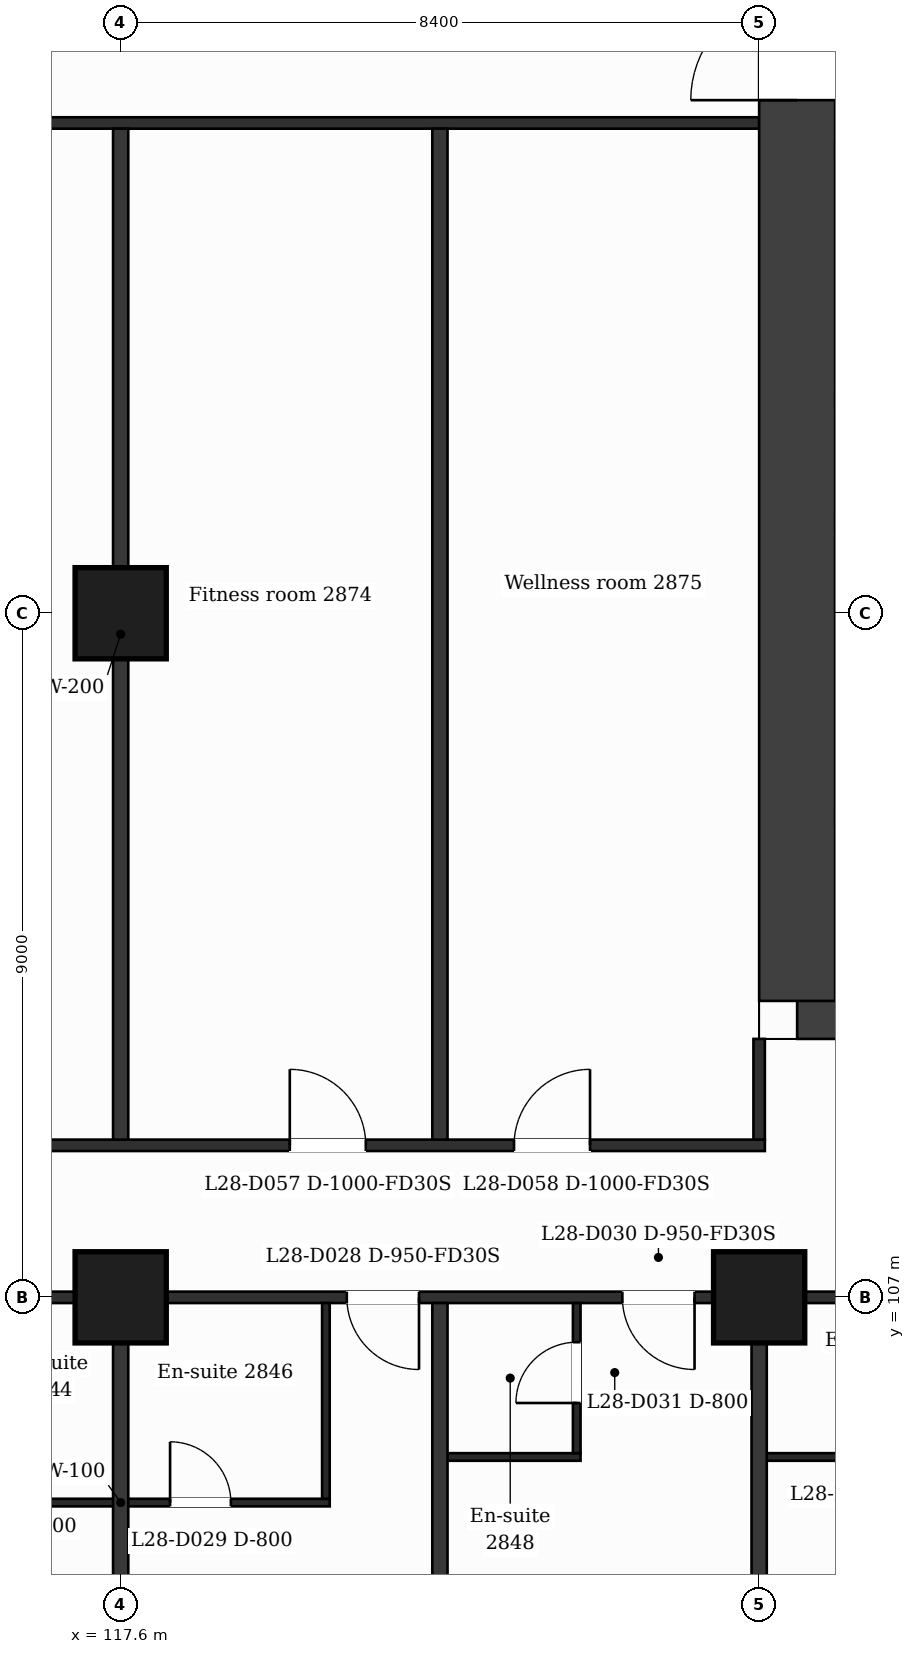
"""IFC4 building model, lengths in metres.
Left out: names, types, materials, properties, quantities, classifications, styles, units other than length and angle.
Written with IfcOpenShell. Run it as: python <this file> out.ifc"""

import sys

from ifc_helpers import new_model, si_unit, direction, frame, frame_2d, origin, origin_2d, place, context, subcontext, project, spatial, rectangle, extrude, element, fill, save


model = new_model("IFC4")
c1 = context("Model", 3, precision=1e-05, world=origin(), true_north=direction((0.0, 1.0)))
c2 = subcontext(c1, "Body", "Model", "MODEL_VIEW")
j1 = project(units=[si_unit("LENGTHUNIT", "METRE"), si_unit("PLANEANGLEUNIT", "RADIAN")], contexts=[c1])
p1 = place(None, origin())
s1 = spatial("IfcSite", under=j1, at=p1, CompositionType="ELEMENT")
p2 = place(p1, origin())
s2 = spatial("IfcBuilding", under=s1, at=p2, CompositionType="ELEMENT")
p3 = place(p2, frame((0.0, 0.0, 120.6)))
s3 = spatial("IfcBuildingStorey", under=s2, at=p3, CompositionType="ELEMENT", Elevation=120.6)
p4 = place(p3, frame((140.559, 110.9, 0.0), z_axis=(0.0, 0.0, 1.0), x_axis=(-1.0, 0.0, 0.0)))
e1 = element("IfcWall", 1, at=p4, inside=s3, PredefinedType="SHEAR", context=c2, shape_type="SweptSolid", body=[
    extrude(rectangle(XDim=14.059, YDim=1.0, at=frame_2d((7.029, 0.0))), origin(), (0.0, 0.0, 1.0), 3.7),
])
p5 = place(p4, frame((6.858, 0.0, 0.0)))
e2 = element("IfcOpeningElement", 2, at=p5, cuts=e1, PredefinedType="OPENING", context=c2, shape_type="SweptSolid", body=[
    extrude(rectangle(XDim=1.4, YDim=2.1, at=frame_2d((0.7, 1.05))), frame((0.0, 0.51, 0.0), z_axis=(0.0, -1.0, 0.0), x_axis=(1.0, 0.0, 0.0)), (0.0, 0.0, 1.0), 1.02),
])
p6 = place(p3, frame((126.5, 110.9, 0.0), z_axis=(0.0, 0.0, 1.0), x_axis=(0.0, 1.0, 0.0)))
e3 = element("IfcWall", 3, at=p6, inside=s3, PredefinedType="SHEAR", context=c2, shape_type="SweptSolid", body=[
    extrude(rectangle(XDim=21.0, YDim=1.0, at=frame_2d((10.5, 0.0))), origin(), (0.0, 0.0, 1.0), 3.7),
])
p7 = place(p6, frame((11.85, 0.0, 0.0)))
e4 = element("IfcOpeningElement", 4, at=p7, cuts=e3, PredefinedType="OPENING", context=c2, shape_type="SweptSolid", body=[
    extrude(rectangle(XDim=1.4, YDim=2.1, at=frame_2d((0.7, 1.05))), frame((0.0, 0.51, 0.0), z_axis=(0.0, -1.0, 0.0), x_axis=(1.0, 0.0, 0.0)), (0.0, 0.0, 1.0), 1.02),
])
for number, where, z_axis, x_axis in (
    (5, (117.6, 107.0, 0.0), (0.0, 0.0, 1.0), (1.0, 0.0, 0.0)),
    (6, (126.0, 107.0, 0.0), (0.0, 0.0, 1.0), (1.0, 0.0, 0.0)),
    (7, (117.6, 116.0, 0.0), (0.0, 0.0, 1.0), (1.0, 0.0, 0.0)),
):
    element("IfcColumn", number, at=place(p3, frame(where, z_axis=z_axis, x_axis=x_axis)), inside=s3, PredefinedType="COLUMN", context=c2, shape_type="SweptSolid", body=[
        extrude(rectangle(XDim=1.2, YDim=1.2, at=origin_2d()), origin(), (0.0, 0.0, 1.0), 3.7),
    ])
p8 = place(p3, frame((114.85, 104.3, 0.0), z_axis=(0.0, 0.0, 1.0), x_axis=(1.0, 0.0, 0.0)))
e8 = element("IfcWall", 8, at=p8, inside=s3, PredefinedType="PARTITIONING", context=c2, shape_type="SweptSolid", body=[
    extrude(rectangle(XDim=5.5, YDim=0.1, at=frame_2d((2.75, 0.0))), origin(), (0.0, 0.0, 1.0), 3.38),
])
p9 = place(p8, frame((3.4, 0.0, 0.0)))
e9 = element("IfcOpeningElement", 9, at=p9, cuts=e8, PredefinedType="OPENING", context=c2, shape_type="SweptSolid", body=[
    extrude(rectangle(XDim=0.8, YDim=2.1, at=frame_2d((0.4, 1.05))), frame((0.0, 0.06, 0.0), z_axis=(0.0, -1.0, 0.0), x_axis=(1.0, 0.0, 0.0)), (0.0, 0.0, 1.0), 0.12),
])
p10 = place(p3, frame((121.8, 104.9, 0.0), z_axis=(0.0, 0.0, 1.0), x_axis=(1.0, 0.0, 0.0)))
e10 = element("IfcWall", 10, at=p10, inside=s3, PredefinedType="PARTITIONING", context=c2, shape_type="SweptSolid", body=[
    extrude(rectangle(XDim=1.85, YDim=0.1, at=frame_2d((0.925, 0.0))), origin(), (0.0, 0.0, 1.0), 3.38),
])
p11 = place(p3, frame((126.0, 104.9, 0.0), z_axis=(0.0, 0.0, 1.0), x_axis=(1.0, 0.0, 0.0)))
e11 = element("IfcWall", 11, at=p11, inside=s3, PredefinedType="PARTITIONING", context=c2, shape_type="SweptSolid", body=[
    extrude(rectangle(XDim=2.75, YDim=0.1, at=frame_2d((1.375, 0.0))), origin(), (0.0, 0.0, 1.0), 3.38),
])
p12 = place(p11, frame((1.07, 0.0, 0.0)))
e12 = element("IfcOpeningElement", 12, at=p12, cuts=e11, PredefinedType="OPENING", context=c2, shape_type="SweptSolid", body=[
    extrude(rectangle(XDim=0.8, YDim=2.1, at=frame_2d((0.4, 1.05))), frame((0.0, 0.06, 0.0), z_axis=(0.0, -1.0, 0.0), x_axis=(1.0, 0.0, 0.0)), (0.0, 0.0, 1.0), 0.12),
])
p13 = place(p3, frame((87.018, 107.0, 0.0), z_axis=(0.0, 0.0, 1.0), x_axis=(1.0, 0.0, 0.0)))
e13 = element("IfcWall", 13, at=p13, inside=s3, PredefinedType="PARTITIONING", context=c2, shape_type="SweptSolid", body=[
    extrude(rectangle(XDim=52.765, YDim=0.15, at=frame_2d((26.382, 0.0))), origin(), (0.0, 0.0, 1.0), 3.38),
])
p14 = place(p13, frame((1.276, 0.0, 0.0)))
e14 = element("IfcOpeningElement", 14, at=p14, cuts=e13, PredefinedType="OPENING", context=c2, shape_type="SweptSolid", body=[
    extrude(rectangle(XDim=0.95, YDim=2.1, at=frame_2d((0.475, 1.05))), frame((0.0, 0.085, 0.0), z_axis=(0.0, -1.0, 0.0), x_axis=(1.0, 0.0, 0.0)), (0.0, 0.0, 1.0), 0.17),
])
p15 = place(p13, frame((6.192, 0.0, 0.0)))
e15 = element("IfcOpeningElement", 15, at=p15, cuts=e13, PredefinedType="OPENING", context=c2, shape_type="SweptSolid", body=[
    extrude(rectangle(XDim=0.95, YDim=2.1, at=frame_2d((0.475, 1.05))), frame((0.0, 0.085, 0.0), z_axis=(0.0, -1.0, 0.0), x_axis=(1.0, 0.0, 0.0)), (0.0, 0.0, 1.0), 0.17),
])
p16 = place(p13, frame((11.982, 0.0, 0.0)))
e16 = element("IfcOpeningElement", 16, at=p16, cuts=e13, PredefinedType="OPENING", context=c2, shape_type="SweptSolid", body=[
    extrude(rectangle(XDim=1.0, YDim=2.1, at=frame_2d((0.5, 1.05))), frame((0.0, 0.085, 0.0), z_axis=(0.0, -1.0, 0.0), x_axis=(1.0, 0.0, 0.0)), (0.0, 0.0, 1.0), 0.17),
])
p17 = place(p13, frame((14.582, 0.0, 0.0)))
e17 = element("IfcOpeningElement", 17, at=p17, cuts=e13, PredefinedType="OPENING", context=c2, shape_type="SweptSolid", body=[
    extrude(rectangle(XDim=0.95, YDim=2.1, at=frame_2d((0.475, 1.05))), frame((0.0, 0.085, 0.0), z_axis=(0.0, -1.0, 0.0), x_axis=(1.0, 0.0, 0.0)), (0.0, 0.0, 1.0), 0.17),
])
p18 = place(p13, frame((18.257, 0.0, 0.0)))
e18 = element("IfcOpeningElement", 18, at=p18, cuts=e13, PredefinedType="OPENING", context=c2, shape_type="SweptSolid", body=[
    extrude(rectangle(XDim=0.95, YDim=2.1, at=frame_2d((0.475, 1.05))), frame((0.0, 0.085, 0.0), z_axis=(0.0, -1.0, 0.0), x_axis=(1.0, 0.0, 0.0)), (0.0, 0.0, 1.0), 0.17),
])
p19 = place(p13, frame((22.992, 0.0, 0.0)))
e19 = element("IfcOpeningElement", 19, at=p19, cuts=e13, PredefinedType="OPENING", context=c2, shape_type="SweptSolid", body=[
    extrude(rectangle(XDim=0.95, YDim=2.1, at=frame_2d((0.475, 1.05))), frame((0.0, 0.085, 0.0), z_axis=(0.0, -1.0, 0.0), x_axis=(1.0, 0.0, 0.0)), (0.0, 0.0, 1.0), 0.17),
])
p20 = place(p13, frame((26.632, 0.0, 0.0)))
e20 = element("IfcOpeningElement", 20, at=p20, cuts=e13, PredefinedType="OPENING", context=c2, shape_type="SweptSolid", body=[
    extrude(rectangle(XDim=1.0, YDim=2.1, at=frame_2d((0.5, 1.05))), frame((0.0, 0.085, 0.0), z_axis=(0.0, -1.0, 0.0), x_axis=(1.0, 0.0, 0.0)), (0.0, 0.0, 1.0), 0.17),
])
p21 = place(p13, frame((33.557, 0.0, 0.0)))
e21 = element("IfcOpeningElement", 21, at=p21, cuts=e13, PredefinedType="OPENING", context=c2, shape_type="SweptSolid", body=[
    extrude(rectangle(XDim=0.95, YDim=2.1, at=frame_2d((0.475, 1.05))), frame((0.0, 0.085, 0.0), z_axis=(0.0, -1.0, 0.0), x_axis=(1.0, 0.0, 0.0)), (0.0, 0.0, 1.0), 0.17),
])
p22 = place(p13, frame((37.182, 0.0, 0.0)))
e22 = element("IfcOpeningElement", 22, at=p22, cuts=e13, PredefinedType="OPENING", context=c2, shape_type="SweptSolid", body=[
    extrude(rectangle(XDim=0.95, YDim=2.1, at=frame_2d((0.475, 1.05))), frame((0.0, 0.085, 0.0), z_axis=(0.0, -1.0, 0.0), x_axis=(1.0, 0.0, 0.0)), (0.0, 0.0, 1.0), 0.17),
])
p23 = place(p13, frame((41.957, 0.0, 0.0)))
e23 = element("IfcOpeningElement", 23, at=p23, cuts=e13, PredefinedType="OPENING", context=c2, shape_type="SweptSolid", body=[
    extrude(rectangle(XDim=0.95, YDim=2.1, at=frame_2d((0.475, 1.05))), frame((0.0, 0.085, 0.0), z_axis=(0.0, -1.0, 0.0), x_axis=(1.0, 0.0, 0.0)), (0.0, 0.0, 1.0), 0.17),
])
p24 = place(p13, frame((45.622, 0.0, 0.0)))
e24 = element("IfcOpeningElement", 24, at=p24, cuts=e13, PredefinedType="OPENING", context=c2, shape_type="SweptSolid", body=[
    extrude(rectangle(XDim=0.95, YDim=2.1, at=frame_2d((0.475, 1.05))), frame((0.0, 0.085, 0.0), z_axis=(0.0, -1.0, 0.0), x_axis=(1.0, 0.0, 0.0)), (0.0, 0.0, 1.0), 0.17),
])
p25 = place(p13, frame((48.56, 0.0, 0.0)))
e25 = element("IfcOpeningElement", 25, at=p25, cuts=e13, PredefinedType="OPENING", context=c2, shape_type="SweptSolid", body=[
    extrude(rectangle(XDim=0.95, YDim=2.1, at=frame_2d((0.475, 1.05))), frame((0.0, 0.085, 0.0), z_axis=(0.0, -1.0, 0.0), x_axis=(1.0, 0.0, 0.0)), (0.0, 0.0, 1.0), 0.17),
])
p26 = place(p3, frame((100.725, 109.0, 0.0), z_axis=(0.0, 0.0, 1.0), x_axis=(1.0, 0.0, 0.0)))
e26 = element("IfcWall", 26, at=p26, inside=s3, PredefinedType="PARTITIONING", context=c2, shape_type="SweptSolid", body=[
    extrude(rectangle(XDim=25.35, YDim=0.15, at=frame_2d((12.675, 0.0))), origin(), (0.0, 0.0, 1.0), 3.38),
])
p27 = place(p26, frame((1.925, 0.0, 0.0)))
e27 = element("IfcOpeningElement", 27, at=p27, cuts=e26, PredefinedType="OPENING", context=c2, shape_type="SweptSolid", body=[
    extrude(rectangle(XDim=1.0, YDim=2.1, at=frame_2d((0.5, 1.05))), frame((0.0, 0.085, 0.0), z_axis=(0.0, -1.0, 0.0), x_axis=(1.0, 0.0, 0.0)), (0.0, 0.0, 1.0), 0.17),
])
p28 = place(p26, frame((6.125, 0.0, 0.0)))
e28 = element("IfcOpeningElement", 28, at=p28, cuts=e26, PredefinedType="OPENING", context=c2, shape_type="SweptSolid", body=[
    extrude(rectangle(XDim=1.0, YDim=2.1, at=frame_2d((0.5, 1.05))), frame((0.0, 0.085, 0.0), z_axis=(0.0, -1.0, 0.0), x_axis=(1.0, 0.0, 0.0)), (0.0, 0.0, 1.0), 0.17),
])
p29 = place(p26, frame((12.175, 0.0, 0.0)))
e29 = element("IfcOpeningElement", 29, at=p29, cuts=e26, PredefinedType="OPENING", context=c2, shape_type="SweptSolid", body=[
    extrude(rectangle(XDim=1.0, YDim=2.1, at=frame_2d((0.5, 1.05))), frame((0.0, 0.085, 0.0), z_axis=(0.0, -1.0, 0.0), x_axis=(1.0, 0.0, 0.0)), (0.0, 0.0, 1.0), 0.17),
])
p30 = place(p26, frame((19.1, 0.0, 0.0)))
e30 = element("IfcOpeningElement", 30, at=p30, cuts=e26, PredefinedType="OPENING", context=c2, shape_type="SweptSolid", body=[
    extrude(rectangle(XDim=1.0, YDim=2.1, at=frame_2d((0.5, 1.05))), frame((0.0, 0.085, 0.0), z_axis=(0.0, -1.0, 0.0), x_axis=(1.0, 0.0, 0.0)), (0.0, 0.0, 1.0), 0.17),
])
p31 = place(p26, frame((22.05, 0.0, 0.0)))
e31 = element("IfcOpeningElement", 31, at=p31, cuts=e26, PredefinedType="OPENING", context=c2, shape_type="SweptSolid", body=[
    extrude(rectangle(XDim=1.0, YDim=2.1, at=frame_2d((0.5, 1.05))), frame((0.0, 0.085, 0.0), z_axis=(0.0, -1.0, 0.0), x_axis=(1.0, 0.0, 0.0)), (0.0, 0.0, 1.0), 0.17),
])
p32 = place(p3, frame((127.0, 113.3, 0.0), z_axis=(0.0, 0.0, 1.0), x_axis=(1.0, 0.0, 0.0)))
e32 = element("IfcWall", 32, at=p32, inside=s3, PredefinedType="PARTITIONING", context=c2, shape_type="SweptSolid", body=[
    extrude(rectangle(XDim=4.673, YDim=0.2, at=frame_2d((2.336, 0.0))), origin(), (0.0, 0.0, 1.0), 3.38),
])
p33 = place(p32, frame((0.715, 0.0, 0.0)))
e33 = element("IfcOpeningElement", 33, at=p33, cuts=e32, PredefinedType="OPENING", context=c2, shape_type="SweptSolid", body=[
    extrude(rectangle(XDim=1.1, YDim=2.1, at=frame_2d((0.55, 1.05))), frame((0.0, 0.11, 0.0), z_axis=(0.0, -1.0, 0.0), x_axis=(1.0, 0.0, 0.0)), (0.0, 0.0, 1.0), 0.22),
])
p34 = place(p3, frame((100.8, 122.45, 0.0), z_axis=(0.0, 0.0, 1.0), x_axis=(1.0, 0.0, 0.0)))
e34 = element("IfcWall", 34, at=p34, inside=s3, PredefinedType="PARTITIONING", context=c2, shape_type="SweptSolid", body=[
    extrude(rectangle(XDim=25.2, YDim=0.15, at=frame_2d((12.6, 0.0))), origin(), (0.0, 0.0, 1.0), 3.38),
])
p35 = place(p3, frame((117.6, 99.79, 0.0), z_axis=(0.0, 0.0, 1.0), x_axis=(0.0, 1.0, 0.0)))
e35 = element("IfcWall", 35, at=p35, inside=s3, PredefinedType="PARTITIONING", context=c2, shape_type="SweptSolid", body=[
    extrude(rectangle(XDim=7.135, YDim=0.2, at=frame_2d((3.567, 0.0))), origin(), (0.0, 0.0, 1.0), 3.38),
])
p36 = place(p3, frame((117.6, 109.075, 0.0), z_axis=(0.0, 0.0, 1.0), x_axis=(0.0, 1.0, 0.0)))
e36 = element("IfcWall", 36, at=p36, inside=s3, PredefinedType="PARTITIONING", context=c2, shape_type="SweptSolid", body=[
    extrude(rectangle(XDim=13.3, YDim=0.2, at=frame_2d((6.65, 0.0))), origin(), (0.0, 0.0, 1.0), 3.38),
])
p37 = place(p3, frame((120.3, 104.35, 0.0), z_axis=(0.0, 0.0, 1.0), x_axis=(0.0, 1.0, 0.0)))
e37 = element("IfcWall", 37, at=p37, inside=s3, PredefinedType="PARTITIONING", context=c2, shape_type="SweptSolid", body=[
    extrude(rectangle(XDim=2.575, YDim=0.1, at=frame_2d((1.288, 0.0))), origin(), (0.0, 0.0, 1.0), 3.38),
])
p38 = place(p3, frame((121.8, 99.79, 0.0), z_axis=(0.0, 0.0, 1.0), x_axis=(0.0, 1.0, 0.0)))
e38 = element("IfcWall", 38, at=p38, inside=s3, PredefinedType="PARTITIONING", context=c2, shape_type="SweptSolid", body=[
    extrude(rectangle(XDim=7.135, YDim=0.2, at=frame_2d((3.567, 0.0))), origin(), (0.0, 0.0, 1.0), 3.38),
])
p39 = place(p3, frame((121.8, 109.075, 0.0), z_axis=(0.0, 0.0, 1.0), x_axis=(0.0, 1.0, 0.0)))
e39 = element("IfcWall", 39, at=p39, inside=s3, PredefinedType="PARTITIONING", context=c2, shape_type="SweptSolid", body=[
    extrude(rectangle(XDim=13.3, YDim=0.2, at=frame_2d((6.65, 0.0))), origin(), (0.0, 0.0, 1.0), 3.38),
])
p40 = place(p3, frame((123.6, 104.95, 0.0), z_axis=(0.0, 0.0, 1.0), x_axis=(0.0, 1.0, 0.0)))
e40 = element("IfcWall", 40, at=p40, inside=s3, PredefinedType="PARTITIONING", context=c2, shape_type="SweptSolid", body=[
    extrude(rectangle(XDim=1.975, YDim=0.1, at=frame_2d((0.988, 0.0))), origin(), (0.0, 0.0, 1.0), 3.38),
])
p41 = place(p40, frame((0.66, 0.0, 0.0)))
e41 = element("IfcOpeningElement", 41, at=p41, cuts=e40, PredefinedType="OPENING", context=c2, shape_type="SweptSolid", body=[
    extrude(rectangle(XDim=0.8, YDim=2.1, at=frame_2d((0.4, 1.05))), frame((0.0, 0.06, 0.0), z_axis=(0.0, -1.0, 0.0), x_axis=(1.0, 0.0, 0.0)), (0.0, 0.0, 1.0), 0.12),
])
p42 = place(p3, frame((126.0, 99.79, 0.0), z_axis=(0.0, 0.0, 1.0), x_axis=(0.0, 1.0, 0.0)))
e42 = element("IfcWall", 42, at=p42, inside=s3, PredefinedType="PARTITIONING", context=c2, shape_type="SweptSolid", body=[
    extrude(rectangle(XDim=7.135, YDim=0.2, at=frame_2d((3.567, 0.0))), origin(), (0.0, 0.0, 1.0), 3.38),
])
p43 = place(p3, frame((126.0, 109.075, 0.0), z_axis=(0.0, 0.0, 1.0), x_axis=(0.0, 1.0, 0.0)))
e43 = element("IfcWall", 43, at=p43, inside=s3, PredefinedType="PARTITIONING", context=c2, shape_type="SweptSolid", body=[
    extrude(rectangle(XDim=1.325, YDim=0.15, at=frame_2d((0.663, 0.0))), origin(), (0.0, 0.0, 1.0), 3.38),
])
p44 = place(p21, origin())
e44 = element("IfcDoor", 44, at=p44, inside=s3, OperationType="SINGLE_SWING_RIGHT", PredefinedType="DOOR", context=c2, shape_type="SweptSolid", body=[
    extrude(rectangle(XDim=0.95, YDim=2.1, at=frame_2d((0.475, 1.05))), frame((0.0, 0.025, 0.0), z_axis=(0.0, -1.0, 0.0), x_axis=(1.0, 0.0, 0.0)), (0.0, 0.0, 1.0), 0.05),
])
fill(e21, e44)
p45 = place(p9, origin())
e45 = element("IfcDoor", 45, at=p45, inside=s3, OperationType="SINGLE_SWING_LEFT", PredefinedType="DOOR", context=c2, shape_type="SweptSolid", body=[
    extrude(rectangle(XDim=0.8, YDim=2.1, at=frame_2d((0.4, 1.05))), frame((0.0, 0.025, 0.0), z_axis=(0.0, -1.0, 0.0), x_axis=(1.0, 0.0, 0.0)), (0.0, 0.0, 1.0), 0.05),
])
fill(e9, e45)
p46 = place(p22, origin())
e46 = element("IfcDoor", 46, at=p46, inside=s3, OperationType="SINGLE_SWING_RIGHT", PredefinedType="DOOR", context=c2, shape_type="SweptSolid", body=[
    extrude(rectangle(XDim=0.95, YDim=2.1, at=frame_2d((0.475, 1.05))), frame((0.0, 0.025, 0.0), z_axis=(0.0, -1.0, 0.0), x_axis=(1.0, 0.0, 0.0)), (0.0, 0.0, 1.0), 0.05),
])
fill(e22, e46)
p47 = place(p41, origin())
e47 = element("IfcDoor", 47, at=p47, inside=s3, OperationType="SINGLE_SWING_LEFT", PredefinedType="DOOR", context=c2, shape_type="SweptSolid", body=[
    extrude(rectangle(XDim=0.8, YDim=2.1, at=frame_2d((0.4, 1.05))), frame((0.0, 0.025, 0.0), z_axis=(0.0, -1.0, 0.0), x_axis=(1.0, 0.0, 0.0)), (0.0, 0.0, 1.0), 0.05),
])
fill(e41, e47)
p48 = place(p30, origin())
e48 = element("IfcDoor", 48, at=p48, inside=s3, OperationType="SINGLE_SWING_LEFT", PredefinedType="DOOR", context=c2, shape_type="SweptSolid", body=[
    extrude(rectangle(XDim=1.0, YDim=2.1, at=frame_2d((0.5, 1.05))), frame((0.0, 0.025, 0.0), z_axis=(0.0, -1.0, 0.0), x_axis=(1.0, 0.0, 0.0)), (0.0, 0.0, 1.0), 0.05),
])
fill(e30, e48)
p49 = place(p31, origin())
e49 = element("IfcDoor", 49, at=p49, inside=s3, OperationType="SINGLE_SWING_RIGHT", PredefinedType="DOOR", context=c2, shape_type="SweptSolid", body=[
    extrude(rectangle(XDim=1.0, YDim=2.1, at=frame_2d((0.5, 1.05))), frame((0.0, 0.025, 0.0), z_axis=(0.0, -1.0, 0.0), x_axis=(1.0, 0.0, 0.0)), (0.0, 0.0, 1.0), 0.05),
])
fill(e31, e49)
p50 = place(p7, origin())
e50 = element("IfcDoor", 50, at=p50, inside=s3, OperationType="SINGLE_SWING_LEFT", PredefinedType="DOOR", context=c2, shape_type="SweptSolid", body=[
    extrude(rectangle(XDim=1.4, YDim=2.1, at=frame_2d((0.7, 1.05))), frame((0.0, 0.025, 0.0), z_axis=(0.0, -1.0, 0.0), x_axis=(1.0, 0.0, 0.0)), (0.0, 0.0, 1.0), 0.05),
])
fill(e4, e50)
save(model, sys.argv[1])
